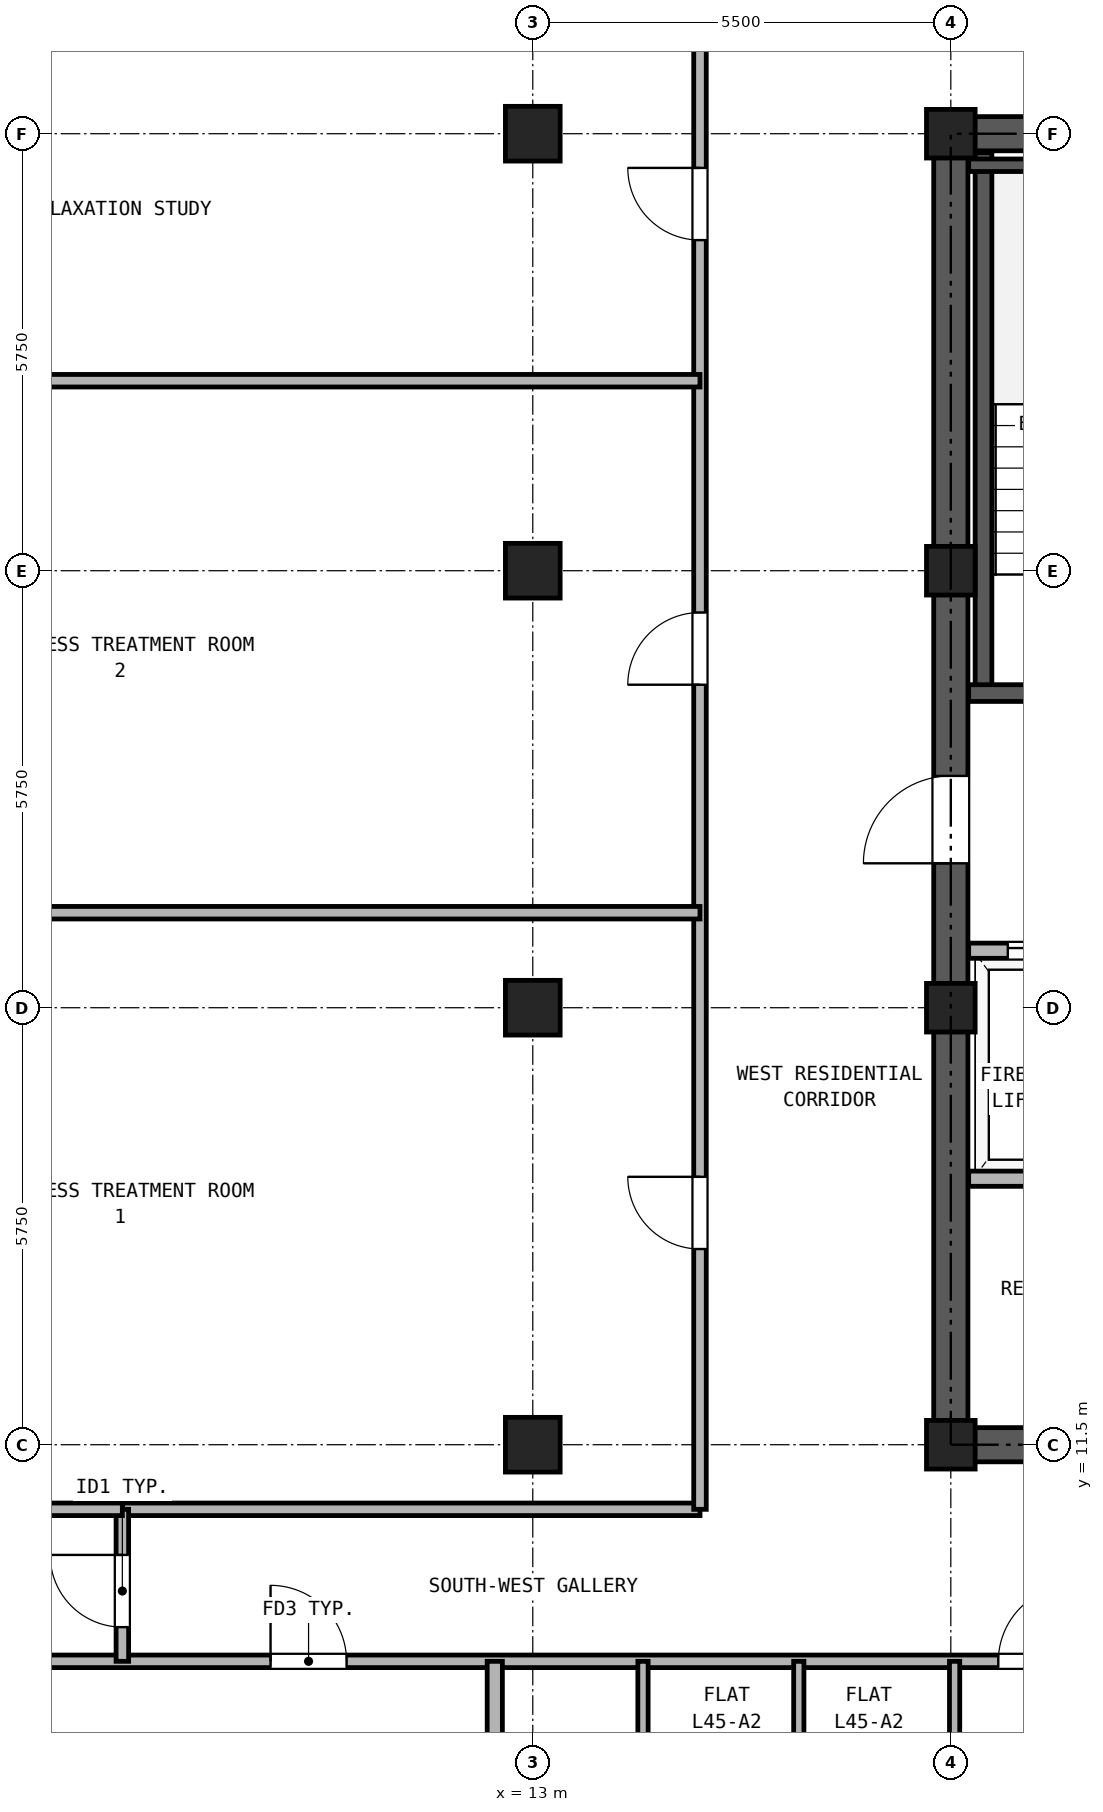
"""IFC4 building model, lengths in metres.
Left out: names, types, materials, properties, quantities, classifications, styles, units other than length and angle.
Written with IfcOpenShell. Run it as: python <this file> out.ifc"""

import sys

from ifc_helpers import new_model, si_unit, direction, frame, frame_2d, origin, origin_2d, place, context, subcontext, project, spatial, rectangle, hollow_rectangle, extrude, source, transform, mapped, element, fill, save


model = new_model("IFC4")
c1 = context("Model", 3, precision=1e-05, world=origin(), true_north=direction((0.0, 1.0)))
c2 = subcontext(c1, "Body", "Model", "MODEL_VIEW")
j1 = project(units=[si_unit("LENGTHUNIT", "METRE"), si_unit("PLANEANGLEUNIT", "RADIAN")], contexts=[c1])
p1 = place(None, origin())
s1 = spatial("IfcSite", under=j1, at=p1, CompositionType="ELEMENT")
p2 = place(p1, origin())
s2 = spatial("IfcBuilding", under=s1, at=p2, CompositionType="ELEMENT")
p3 = place(p2, frame((0.0, 0.0, 162.5)))
s3 = spatial("IfcBuildingStorey", under=s2, at=p3, CompositionType="ELEMENT", Elevation=162.5)
m1 = source(origin(), c2, "Body", "SweptSolid", [
    extrude(hollow_rectangle(XDim=0.72, YDim=0.72, WallThickness=0.04, at=origin_2d()), origin(), (0.0, 0.0, 1.0), 2.95),
])
for number, where, z_axis, x_axis in (
    (1, (13.0, 11.5, 0.0), (0.0, 0.0, 1.0), (1.0, 0.0, 0.0)),
    (2, (13.0, 17.25, 0.0), (0.0, 0.0, 1.0), (1.0, 0.0, 0.0)),
    (3, (13.0, 23.0, 0.0), (0.0, 0.0, 1.0), (1.0, 0.0, 0.0)),
    (4, (13.0, 28.75, 0.0), (0.0, 0.0, 1.0), (1.0, 0.0, 0.0)),
):
    element("IfcColumn", number, at=place(p3, frame(where, z_axis=z_axis, x_axis=x_axis)), inside=s3, PredefinedType="COLUMN", context=c2, shape_type="MappedRepresentation", body=[
        mapped(m1, transform((0.0, 0.0, 0.0), x_axis=(1.0, 0.0, 0.0), y_axis=(0.0, 1.0, 0.0), z_axis=(0.0, 0.0, 1.0), scale=1.0)),
    ])
m2 = source(origin(), c2, "Body", "SweptSolid", [
    extrude(hollow_rectangle(XDim=0.64, YDim=0.64, WallThickness=0.035, at=origin_2d()), origin(), (0.0, 0.0, 1.0), 2.95),
])
for number, where, z_axis, x_axis in (
    (5, (18.5, 11.5, 0.0), (0.0, 0.0, 1.0), (1.0, 0.0, 0.0)),
    (6, (18.5, 17.25, 0.0), (0.0, 0.0, 1.0), (1.0, 0.0, 0.0)),
    (7, (18.5, 23.0, 0.0), (0.0, 0.0, 1.0), (1.0, 0.0, 0.0)),
    (8, (18.5, 28.75, 0.0), (0.0, 0.0, 1.0), (1.0, 0.0, 0.0)),
):
    element("IfcColumn", number, at=place(p3, frame(where, z_axis=z_axis, x_axis=x_axis)), inside=s3, PredefinedType="COLUMN", context=c2, shape_type="MappedRepresentation", body=[
        mapped(m2, transform((0.0, 0.0, 0.0), x_axis=(1.0, 0.0, 0.0), y_axis=(0.0, 1.0, 0.0), z_axis=(0.0, 0.0, 1.0), scale=1.0)),
    ])
p4 = place(p3, frame((18.275, 11.5, 0.0), z_axis=(0.0, 0.0, 1.0), x_axis=(1.0, 0.0, 0.0)))
e9 = element("IfcWall", 9, at=p4, inside=s3, PredefinedType="SHEAR", context=c2, shape_type="SweptSolid", body=[
    extrude(rectangle(XDim=10.45, YDim=0.45, at=frame_2d((5.225, 0.0))), origin(), (0.0, 0.0, 1.0), 2.95),
])
p5 = place(p4, frame((1.825, 0.0, 0.0)))
e10 = element("IfcOpeningElement", 10, at=p5, cuts=e9, PredefinedType="OPENING", context=c2, shape_type="SweptSolid", body=[
    extrude(rectangle(XDim=0.95, YDim=2.15, at=frame_2d((0.475, 1.075))), frame((0.0, 0.235, 0.0), z_axis=(0.0, -1.0, 0.0), x_axis=(1.0, 0.0, 0.0)), (0.0, 0.0, 1.0), 0.47),
])
p6 = place(p4, frame((5.325, 0.0, 0.0)))
e11 = element("IfcOpeningElement", 11, at=p6, cuts=e9, PredefinedType="OPENING", context=c2, shape_type="SweptSolid", body=[
    extrude(rectangle(XDim=0.95, YDim=2.15, at=frame_2d((0.475, 1.075))), frame((0.0, 0.235, 0.0), z_axis=(0.0, -1.0, 0.0), x_axis=(1.0, 0.0, 0.0)), (0.0, 0.0, 1.0), 0.47),
])
p7 = place(p4, frame((8.225, 0.0, 0.0)))
e12 = element("IfcOpeningElement", 12, at=p7, cuts=e9, PredefinedType="OPENING", context=c2, shape_type="SweptSolid", body=[
    extrude(rectangle(XDim=1.1, YDim=2.25, at=frame_2d((0.55, 1.125))), frame((0.0, 0.235, 0.0), z_axis=(0.0, -1.0, 0.0), x_axis=(1.0, 0.0, 0.0)), (0.0, 0.0, 1.0), 0.47),
])
p8 = place(p3, frame((18.275, 28.75, 0.0), z_axis=(0.0, 0.0, 1.0), x_axis=(1.0, 0.0, 0.0)))
e13 = element("IfcWall", 13, at=p8, inside=s3, PredefinedType="SHEAR", context=c2, shape_type="SweptSolid", body=[
    extrude(rectangle(XDim=10.45, YDim=0.45, at=frame_2d((5.225, 0.0))), origin(), (0.0, 0.0, 1.0), 2.95),
])
p9 = place(p8, frame((4.105, 0.0, 0.0)))
e14 = element("IfcOpeningElement", 14, at=p9, cuts=e13, PredefinedType="OPENING", context=c2, shape_type="SweptSolid", body=[
    extrude(rectangle(XDim=0.9, YDim=2.05, at=frame_2d((0.45, 1.025))), frame((0.0, 0.235, 0.0), z_axis=(0.0, -1.0, 0.0), x_axis=(1.0, 0.0, 0.0)), (0.0, 0.0, 1.0), 0.47),
])
p10 = place(p8, frame((5.645, 0.0, 0.0)))
e15 = element("IfcOpeningElement", 15, at=p10, cuts=e13, PredefinedType="OPENING", context=c2, shape_type="SweptSolid", body=[
    extrude(rectangle(XDim=0.9, YDim=2.05, at=frame_2d((0.45, 1.025))), frame((0.0, 0.235, 0.0), z_axis=(0.0, -1.0, 0.0), x_axis=(1.0, 0.0, 0.0)), (0.0, 0.0, 1.0), 0.47),
])
p11 = place(p3, frame((18.5, 11.725, 0.0), z_axis=(0.0, 0.0, 1.0), x_axis=(0.0, 1.0, 0.0)))
e16 = element("IfcWall", 16, at=p11, inside=s3, PredefinedType="SHEAR", context=c2, shape_type="SweptSolid", body=[
    extrude(rectangle(XDim=16.8, YDim=0.45, at=frame_2d((8.4, 0.0))), origin(), (0.0, 0.0, 1.0), 2.95),
])
p12 = place(p11, frame((7.425, 0.0, 0.0)))
e17 = element("IfcOpeningElement", 17, at=p12, cuts=e16, PredefinedType="OPENING", context=c2, shape_type="SweptSolid", body=[
    extrude(rectangle(XDim=1.15, YDim=2.2, at=frame_2d((0.575, 1.1))), frame((0.0, 0.235, 0.0), z_axis=(0.0, -1.0, 0.0), x_axis=(1.0, 0.0, 0.0)), (0.0, 0.0, 1.0), 0.47),
])
p13 = place(p3, frame((18.93, 21.39, 0.0), z_axis=(0.0, 0.0, 1.0), x_axis=(0.0, 1.0, 0.0)))
e18 = element("IfcWall", 18, at=p13, inside=s3, PredefinedType="SOLIDWALL", context=c2, shape_type="SweptSolid", body=[
    extrude(rectangle(XDim=7.11, YDim=0.22, at=frame_2d((3.555, 0.0))), origin(), (0.0, 0.0, 1.0), 2.95),
])
p14 = place(p3, frame((18.735, 28.335, 0.0), z_axis=(0.0, 0.0, 1.0), x_axis=(1.0, 0.0, 0.0)))
e19 = element("IfcWall", 19, at=p14, inside=s3, PredefinedType="PARTITIONING", context=c2, shape_type="SweptSolid", body=[
    extrude(rectangle(XDim=3.375, YDim=0.165, at=frame_2d((1.688, 0.0))), origin(), (0.0, 0.0, 1.0), 2.95),
])
p15 = place(p3, frame((18.735, 21.39, 0.0), z_axis=(0.0, 0.0, 1.0), x_axis=(1.0, 0.0, 0.0)))
e20 = element("IfcWall", 20, at=p15, inside=s3, PredefinedType="SOLIDWALL", context=c2, shape_type="SweptSolid", body=[
    extrude(rectangle(XDim=6.395, YDim=0.22, at=frame_2d((3.197, 0.0))), origin(), (0.0, 0.0, 1.0), 2.95),
])
p16 = place(p15, frame((1.115, 0.0, 0.0)))
e21 = element("IfcOpeningElement", 21, at=p16, cuts=e20, PredefinedType="OPENING", context=c2, shape_type="SweptSolid", body=[
    extrude(rectangle(XDim=1.15, YDim=2.2, at=frame_2d((0.575, 1.1))), frame((0.0, 0.12, 0.0), z_axis=(0.0, -1.0, 0.0), x_axis=(1.0, 0.0, 0.0)), (0.0, 0.0, 1.0), 0.24),
])
p17 = place(p15, frame((4.845, 0.0, 0.0)))
e22 = element("IfcOpeningElement", 22, at=p17, cuts=e20, PredefinedType="OPENING", context=c2, shape_type="SweptSolid", body=[
    extrude(rectangle(XDim=1.1, YDim=2.25, at=frame_2d((0.55, 1.125))), frame((0.0, 0.12, 0.0), z_axis=(0.0, -1.0, 0.0), x_axis=(1.0, 0.0, 0.0)), (0.0, 0.0, 1.0), 0.24),
])
p18 = place(p3, frame((18.735, 18.0, 0.0), z_axis=(0.0, 0.0, 1.0), x_axis=(1.0, 0.0, 0.0)))
e23 = element("IfcWall", 23, at=p18, inside=s3, PredefinedType="PARTITIONING", context=c2, shape_type="SweptSolid", body=[
    extrude(rectangle(XDim=9.53, YDim=0.2, at=frame_2d((4.765, 0.0))), origin(), (0.0, 0.0, 1.0), 2.95),
])
p19 = place(p18, frame((0.515, 0.0, 0.0)))
e24 = element("IfcOpeningElement", 24, at=p19, cuts=e23, PredefinedType="OPENING", context=c2, shape_type="SweptSolid", body=[
    extrude(rectangle(XDim=1.3, YDim=2.3, at=frame_2d((0.65, 1.15))), frame((0.0, 0.11, 0.0), z_axis=(0.0, -1.0, 0.0), x_axis=(1.0, 0.0, 0.0)), (0.0, 0.0, 1.0), 0.22),
])
p20 = place(p18, frame((2.615, 0.0, 0.0)))
e25 = element("IfcOpeningElement", 25, at=p20, cuts=e23, PredefinedType="OPENING", context=c2, shape_type="SweptSolid", body=[
    extrude(rectangle(XDim=1.3, YDim=2.3, at=frame_2d((0.65, 1.15))), frame((0.0, 0.11, 0.0), z_axis=(0.0, -1.0, 0.0), x_axis=(1.0, 0.0, 0.0)), (0.0, 0.0, 1.0), 0.22),
])
p21 = place(p18, frame((5.035, 0.0, 0.0)))
e26 = element("IfcOpeningElement", 26, at=p21, cuts=e23, PredefinedType="OPENING", context=c2, shape_type="SweptSolid", body=[
    extrude(rectangle(XDim=0.9, YDim=2.05, at=frame_2d((0.45, 1.025))), frame((0.0, 0.11, 0.0), z_axis=(0.0, -1.0, 0.0), x_axis=(1.0, 0.0, 0.0)), (0.0, 0.0, 1.0), 0.22),
])
p22 = place(p18, frame((8.165, 0.0, 0.0)))
e27 = element("IfcOpeningElement", 27, at=p22, cuts=e23, PredefinedType="OPENING", context=c2, shape_type="SweptSolid", body=[
    extrude(rectangle(XDim=0.9, YDim=2.05, at=frame_2d((0.45, 1.025))), frame((0.0, 0.11, 0.0), z_axis=(0.0, -1.0, 0.0), x_axis=(1.0, 0.0, 0.0)), (0.0, 0.0, 1.0), 0.22),
])
p23 = place(p3, frame((18.735, 15.0, 0.0), z_axis=(0.0, 0.0, 1.0), x_axis=(1.0, 0.0, 0.0)))
e28 = element("IfcWall", 28, at=p23, inside=s3, PredefinedType="PARTITIONING", context=c2, shape_type="SweptSolid", body=[
    extrude(rectangle(XDim=9.53, YDim=0.2, at=frame_2d((4.765, 0.0))), origin(), (0.0, 0.0, 1.0), 2.95),
])
p24 = place(p3, frame((0.16, 8.65, 0.0), z_axis=(0.0, 0.0, 1.0), x_axis=(1.0, 0.0, 0.0)))
e29 = element("IfcWall", 29, at=p24, inside=s3, PredefinedType="PARTITIONING", context=c2, shape_type="SweptSolid", body=[
    extrude(rectangle(XDim=41.48, YDim=0.165, at=frame_2d((20.74, 0.0))), origin(), (0.0, 0.0, 1.0), 2.583),
])
p25 = place(p24, frame((9.39, 0.0, 0.0)))
e30 = element("IfcOpeningElement", 30, at=p25, cuts=e29, PredefinedType="OPENING", context=c2, shape_type="SweptSolid", body=[
    extrude(rectangle(XDim=1.0, YDim=2.15, at=frame_2d((0.5, 1.075))), frame((0.0, 0.093, 0.0), z_axis=(0.0, -1.0, 0.0), x_axis=(1.0, 0.0, 0.0)), (0.0, 0.0, 1.0), 0.185),
])
p26 = place(p24, frame((18.965, 0.0, 0.0)))
e31 = element("IfcOpeningElement", 31, at=p26, cuts=e29, PredefinedType="OPENING", context=c2, shape_type="SweptSolid", body=[
    extrude(rectangle(XDim=1.0, YDim=2.15, at=frame_2d((0.5, 1.075))), frame((0.0, 0.093, 0.0), z_axis=(0.0, -1.0, 0.0), x_axis=(1.0, 0.0, 0.0)), (0.0, 0.0, 1.0), 0.185),
])
p27 = place(p24, frame((26.34, 0.0, 0.0)))
e32 = element("IfcOpeningElement", 32, at=p27, cuts=e29, PredefinedType="OPENING", context=c2, shape_type="SweptSolid", body=[
    extrude(rectangle(XDim=1.0, YDim=2.15, at=frame_2d((0.5, 1.075))), frame((0.0, 0.093, 0.0), z_axis=(0.0, -1.0, 0.0), x_axis=(1.0, 0.0, 0.0)), (0.0, 0.0, 1.0), 0.185),
])
p28 = place(p24, frame((31.715, 0.0, 0.0)))
e33 = element("IfcOpeningElement", 33, at=p28, cuts=e29, PredefinedType="OPENING", context=c2, shape_type="SweptSolid", body=[
    extrude(rectangle(XDim=1.0, YDim=2.15, at=frame_2d((0.5, 1.075))), frame((0.0, 0.093, 0.0), z_axis=(0.0, -1.0, 0.0), x_axis=(1.0, 0.0, 0.0)), (0.0, 0.0, 1.0), 0.185),
])
p29 = place(p3, frame((7.6, 10.65, 0.0), z_axis=(0.0, 0.0, 1.0), x_axis=(1.0, 0.0, 0.0)))
e34 = element("IfcWall", 34, at=p29, inside=s3, PredefinedType="PARTITIONING", context=c2, shape_type="SweptSolid", body=[
    extrude(rectangle(XDim=7.6, YDim=0.165, at=frame_2d((3.8, 0.0))), origin(), (0.0, 0.0, 1.0), 2.95),
])
p30 = place(p3, frame((7.6, 8.65, 0.0), z_axis=(0.0, 0.0, 1.0), x_axis=(0.0, 1.0, 0.0)))
e35 = element("IfcWall", 35, at=p30, inside=s3, PredefinedType="PARTITIONING", context=c2, shape_type="SweptSolid", body=[
    extrude(rectangle(XDim=2.0, YDim=0.165, at=frame_2d((1.0, 0.0))), origin(), (0.0, 0.0, 1.0), 2.95),
])
p31 = place(p30, frame((0.45, 0.0, 0.0)))
e36 = element("IfcOpeningElement", 36, at=p31, cuts=e35, PredefinedType="OPENING", context=c2, shape_type="SweptSolid", body=[
    extrude(rectangle(XDim=0.95, YDim=2.15, at=frame_2d((0.475, 1.075))), frame((0.0, 0.093, 0.0), z_axis=(0.0, -1.0, 0.0), x_axis=(1.0, 0.0, 0.0)), (0.0, 0.0, 1.0), 0.185),
])
p32 = place(p3, frame((15.2, 10.65, 0.0), z_axis=(0.0, 0.0, 1.0), x_axis=(0.0, 1.0, 0.0)))
e37 = element("IfcWall", 37, at=p32, inside=s3, PredefinedType="PARTITIONING", context=c2, shape_type="SweptSolid", body=[
    extrude(rectangle(XDim=24.49, YDim=0.165, at=frame_2d((12.245, 0.0))), origin(), (0.0, 0.0, 1.0), 2.95),
])
p33 = place(p32, frame((3.425, 0.0, 0.0)))
e38 = element("IfcOpeningElement", 38, at=p33, cuts=e37, PredefinedType="OPENING", context=c2, shape_type="SweptSolid", body=[
    extrude(rectangle(XDim=0.95, YDim=2.15, at=frame_2d((0.475, 1.075))), frame((0.0, 0.093, 0.0), z_axis=(0.0, -1.0, 0.0), x_axis=(1.0, 0.0, 0.0)), (0.0, 0.0, 1.0), 0.185),
])
p34 = place(p32, frame((10.85, 0.0, 0.0)))
e39 = element("IfcOpeningElement", 39, at=p34, cuts=e37, PredefinedType="OPENING", context=c2, shape_type="SweptSolid", body=[
    extrude(rectangle(XDim=0.95, YDim=2.15, at=frame_2d((0.475, 1.075))), frame((0.0, 0.093, 0.0), z_axis=(0.0, -1.0, 0.0), x_axis=(1.0, 0.0, 0.0)), (0.0, 0.0, 1.0), 0.185),
])
p35 = place(p32, frame((16.7, 0.0, 0.0)))
e40 = element("IfcOpeningElement", 40, at=p35, cuts=e37, PredefinedType="OPENING", context=c2, shape_type="SweptSolid", body=[
    extrude(rectangle(XDim=0.95, YDim=2.15, at=frame_2d((0.475, 1.075))), frame((0.0, 0.093, 0.0), z_axis=(0.0, -1.0, 0.0), x_axis=(1.0, 0.0, 0.0)), (0.0, 0.0, 1.0), 0.185),
])
p36 = place(p32, frame((21.52, 0.0, 0.0)))
e41 = element("IfcOpeningElement", 41, at=p36, cuts=e37, PredefinedType="OPENING", context=c2, shape_type="SweptSolid", body=[
    extrude(rectangle(XDim=0.92, YDim=2.1, at=frame_2d((0.46, 1.05))), frame((0.0, 0.093, 0.0), z_axis=(0.0, -1.0, 0.0), x_axis=(1.0, 0.0, 0.0)), (0.0, 0.0, 1.0), 0.185),
])
p37 = place(p3, frame((12.5, 0.16, 0.0), z_axis=(0.0, 0.0, 1.0), x_axis=(0.0, 1.0, 0.0)))
e42 = element("IfcWall", 42, at=p37, inside=s3, PredefinedType="PARTITIONING", context=c2, shape_type="SweptSolid", body=[
    extrude(rectangle(XDim=8.49, YDim=0.2, at=frame_2d((4.245, 0.0))), origin(), (0.0, 0.0, 1.0), 2.95),
])
for number, where, z_axis, x_axis in (
    (43, (14.45, 6.5, 0.0), (0.0, 0.0, 1.0), (0.0, 1.0, 0.0)),
    (44, (16.5, 6.5, 0.0), (0.0, 0.0, 1.0), (0.0, 1.0, 0.0)),
):
    element("IfcWall", number, at=place(p3, frame(where, z_axis=z_axis, x_axis=x_axis)), inside=s3, PredefinedType="PARTITIONING", context=c2, shape_type="SweptSolid", body=[
        extrude(rectangle(XDim=2.15, YDim=0.135, at=frame_2d((1.075, 0.0))), origin(), (0.0, 0.0, 1.0), 2.95),
    ])
p38 = place(p3, frame((18.55, 6.5, 0.0), z_axis=(0.0, 0.0, 1.0), x_axis=(0.0, 1.0, 0.0)))
e45 = element("IfcWall", 45, at=p38, inside=s3, PredefinedType="PARTITIONING", context=c2, shape_type="SweptSolid", body=[
    extrude(rectangle(XDim=2.15, YDim=0.135, at=frame_2d((1.075, 0.0))), origin(), (0.0, 0.0, 1.0), 2.323),
])
p39 = place(p3, frame((0.16, 10.65, 0.0), z_axis=(0.0, 0.0, 1.0), x_axis=(1.0, 0.0, 0.0)))
e46 = element("IfcWall", 46, at=p39, inside=s3, PredefinedType="PARTITIONING", context=c2, shape_type="SweptSolid", body=[
    extrude(rectangle(XDim=7.44, YDim=0.165, at=frame_2d((3.72, 0.0))), origin(), (0.0, 0.0, 1.0), 2.95),
])
for number, where, z_axis, x_axis in (
    (47, (0.16, 18.5, 0.0), (0.0, 0.0, 1.0), (1.0, 0.0, 0.0)),
    (48, (0.16, 25.5, 0.0), (0.0, 0.0, 1.0), (1.0, 0.0, 0.0)),
):
    element("IfcWall", number, at=place(p3, frame(where, z_axis=z_axis, x_axis=x_axis)), inside=s3, PredefinedType="PARTITIONING", context=c2, shape_type="SweptSolid", body=[
        extrude(rectangle(XDim=15.04, YDim=0.165, at=frame_2d((7.52, 0.0))), origin(), (0.0, 0.0, 1.0), 2.95),
    ])
p40 = place(p19, origin())
e49 = element("IfcDoor", 49, at=p40, inside=s3, OperationType="DOUBLE_DOOR_SLIDING", PredefinedType="DOOR", context=c2, shape_type="SweptSolid", body=[
    extrude(rectangle(XDim=1.3, YDim=2.3, at=frame_2d((0.65, 1.15))), frame((0.0, 0.025, 0.0), z_axis=(0.0, -1.0, 0.0), x_axis=(1.0, 0.0, 0.0)), (0.0, 0.0, 1.0), 0.05),
])
fill(e24, e49)
p41 = place(p12, frame((1.15, 0.0, 0.0), z_axis=(0.0, 0.0, 1.0), x_axis=(-1.0, 0.0, 0.0)))
e50 = element("IfcDoor", 50, at=p41, inside=s3, OperationType="SINGLE_SWING_LEFT", PredefinedType="DOOR", context=c2, shape_type="SweptSolid", body=[
    extrude(rectangle(XDim=1.15, YDim=2.2, at=frame_2d((0.575, 1.1))), frame((0.0, 0.025, 0.0), z_axis=(0.0, -1.0, 0.0), x_axis=(1.0, 0.0, 0.0)), (0.0, 0.0, 1.0), 0.05),
])
fill(e17, e50)
p42 = place(p25, frame((1.0, 0.0, 0.0), z_axis=(0.0, 0.0, 1.0), x_axis=(-1.0, 0.0, 0.0)))
e51 = element("IfcDoor", 51, at=p42, inside=s3, OperationType="SINGLE_SWING_LEFT", PredefinedType="DOOR", context=c2, shape_type="SweptSolid", body=[
    extrude(rectangle(XDim=1.0, YDim=2.15, at=frame_2d((0.5, 1.075))), frame((0.0, 0.025, 0.0), z_axis=(0.0, -1.0, 0.0), x_axis=(1.0, 0.0, 0.0)), (0.0, 0.0, 1.0), 0.05),
])
fill(e30, e51)
p43 = place(p26, frame((1.0, 0.0, 0.0), z_axis=(0.0, 0.0, 1.0), x_axis=(-1.0, 0.0, 0.0)))
e52 = element("IfcDoor", 52, at=p43, inside=s3, OperationType="SINGLE_SWING_RIGHT", PredefinedType="DOOR", context=c2, shape_type="SweptSolid", body=[
    extrude(rectangle(XDim=1.0, YDim=2.15, at=frame_2d((0.5, 1.075))), frame((0.0, 0.025, 0.0), z_axis=(0.0, -1.0, 0.0), x_axis=(1.0, 0.0, 0.0)), (0.0, 0.0, 1.0), 0.05),
])
fill(e31, e52)
p44 = place(p31, frame((0.95, 0.0, 0.0), z_axis=(0.0, 0.0, 1.0), x_axis=(-1.0, 0.0, 0.0)))
e53 = element("IfcDoor", 53, at=p44, inside=s3, OperationType="SINGLE_SWING_RIGHT", PredefinedType="DOOR", context=c2, shape_type="SweptSolid", body=[
    extrude(rectangle(XDim=0.95, YDim=2.15, at=frame_2d((0.475, 1.075))), frame((0.0, 0.025, 0.0), z_axis=(0.0, -1.0, 0.0), x_axis=(1.0, 0.0, 0.0)), (0.0, 0.0, 1.0), 0.05),
])
fill(e36, e53)
p45 = place(p33, frame((0.95, 0.0, 0.0), z_axis=(0.0, 0.0, 1.0), x_axis=(-1.0, 0.0, 0.0)))
e54 = element("IfcDoor", 54, at=p45, inside=s3, OperationType="SINGLE_SWING_RIGHT", PredefinedType="DOOR", context=c2, shape_type="SweptSolid", body=[
    extrude(rectangle(XDim=0.95, YDim=2.15, at=frame_2d((0.475, 1.075))), frame((0.0, 0.025, 0.0), z_axis=(0.0, -1.0, 0.0), x_axis=(1.0, 0.0, 0.0)), (0.0, 0.0, 1.0), 0.05),
])
fill(e38, e54)
p46 = place(p34, frame((0.95, 0.0, 0.0), z_axis=(0.0, 0.0, 1.0), x_axis=(-1.0, 0.0, 0.0)))
e55 = element("IfcDoor", 55, at=p46, inside=s3, OperationType="SINGLE_SWING_LEFT", PredefinedType="DOOR", context=c2, shape_type="SweptSolid", body=[
    extrude(rectangle(XDim=0.95, YDim=2.15, at=frame_2d((0.475, 1.075))), frame((0.0, 0.025, 0.0), z_axis=(0.0, -1.0, 0.0), x_axis=(1.0, 0.0, 0.0)), (0.0, 0.0, 1.0), 0.05),
])
fill(e39, e55)
p47 = place(p35, frame((0.95, 0.0, 0.0), z_axis=(0.0, 0.0, 1.0), x_axis=(-1.0, 0.0, 0.0)))
e56 = element("IfcDoor", 56, at=p47, inside=s3, OperationType="SINGLE_SWING_RIGHT", PredefinedType="DOOR", context=c2, shape_type="SweptSolid", body=[
    extrude(rectangle(XDim=0.95, YDim=2.15, at=frame_2d((0.475, 1.075))), frame((0.0, 0.025, 0.0), z_axis=(0.0, -1.0, 0.0), x_axis=(1.0, 0.0, 0.0)), (0.0, 0.0, 1.0), 0.05),
])
fill(e40, e56)
save(model, sys.argv[1])
